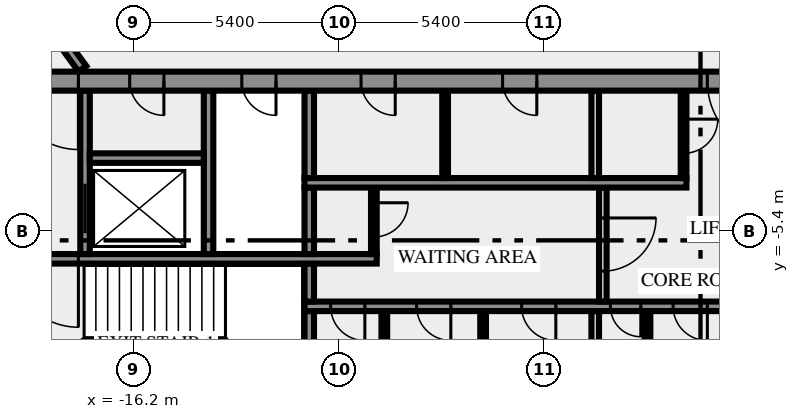
"""IFC4 building model, lengths in metres.
Left out: names, types, materials, properties, quantities, classifications, styles, units other than length and angle.
Written with IfcOpenShell. Run it as: python <this file> out.ifc"""

import sys

from ifc_helpers import new_model, si_unit, direction, frame, frame_2d, origin, place, context, subcontext, project, spatial, rectangle, extrude, element, fill, save


model = new_model("IFC4")
c1 = context("Model", 3, precision=1e-05, world=origin(), true_north=direction((0.0, 1.0)))
c2 = subcontext(c1, "Body", "Model", "MODEL_VIEW")
j1 = project(units=[si_unit("LENGTHUNIT", "METRE"), si_unit("PLANEANGLEUNIT", "RADIAN")], contexts=[c1])
p1 = place(None, origin())
s1 = spatial("IfcSite", under=j1, at=p1, CompositionType="ELEMENT")
p2 = place(p1, origin())
s2 = spatial("IfcBuilding", under=s1, at=p2, CompositionType="ELEMENT")
p3 = place(p2, frame((0.0, 0.0, 144.0)))
s3 = spatial("IfcBuildingStorey", under=s2, at=p3, CompositionType="ELEMENT", Elevation=144.0)
p4 = place(p3, frame((-11.575, -10.5, 0.0), z_axis=(0.0, 0.0, 1.0), x_axis=(0.0, 1.0, 0.0)))
e1 = element("IfcWall", 1, at=p4, inside=s3, PredefinedType="SHEAR", context=c2, shape_type="SweptSolid", body=[
    extrude(rectangle(XDim=3.0, YDim=0.25, at=frame_2d((1.5, 0.0))), origin(), (0.0, 0.0, 1.0), 3.65),
])
for number, where, z_axis, x_axis in (
    (2, (-9.6, -10.5, 0.0), (0.0, 0.0, 1.0), (0.0, 1.0, 0.0)),
    (3, (-7.0, -10.5, 0.0), (0.0, 0.0, 1.0), (0.0, 1.0, 0.0)),
):
    element("IfcWall", number, at=place(p3, frame(where, z_axis=z_axis, x_axis=x_axis)), inside=s3, PredefinedType="PARTITIONING", context=c2, shape_type="SweptSolid", body=[
        extrude(rectangle(XDim=3.0, YDim=0.15, at=frame_2d((1.5, 0.0))), origin(), (0.0, 0.0, 1.0), 3.65),
    ])
p5 = place(p3, frame((-4.05, -10.5, 0.0), z_axis=(0.0, 0.0, 1.0), x_axis=(0.0, 1.0, 0.0)))
e4 = element("IfcWall", 4, at=p5, inside=s3, PredefinedType="SOLIDWALL", context=c2, shape_type="SweptSolid", body=[
    extrude(rectangle(XDim=3.0, YDim=0.2, at=frame_2d((1.5, 0.0))), origin(), (0.0, 0.0, 1.0), 3.65),
])
p6 = place(p3, frame((-2.675, -10.5, 0.0), z_axis=(0.0, 0.0, 1.0), x_axis=(0.0, 1.0, 0.0)))
e5 = element("IfcWall", 5, at=p6, inside=s3, PredefinedType="PARTITIONING", context=c2, shape_type="SweptSolid", body=[
    extrude(rectangle(XDim=3.0, YDim=0.15, at=frame_2d((1.5, 0.0))), origin(), (0.0, 0.0, 1.0), 3.65),
])
p7 = place(p3, frame((11.7, -7.375, 0.0), z_axis=(0.0, 0.0, 1.0), x_axis=(-1.0, 0.0, 0.0)))
e6 = element("IfcWall", 6, at=p7, inside=s3, PredefinedType="SHEAR", context=c2, shape_type="SweptSolid", body=[
    extrude(rectangle(XDim=23.4, YDim=0.25, at=frame_2d((11.7, 0.0))), origin(), (0.0, 0.0, 1.0), 3.65),
])
p8 = place(p7, frame((21.812, 0.0, 0.0)))
e7 = element("IfcOpeningElement", 7, at=p8, cuts=e6, PredefinedType="OPENING", context=c2, shape_type="SweptSolid", body=[
    extrude(rectangle(XDim=0.9, YDim=2.1, at=frame_2d((0.45, 1.05))), frame((0.0, 0.135, 0.0), z_axis=(0.0, -1.0, 0.0), x_axis=(1.0, 0.0, 0.0)), (0.0, 0.0, 1.0), 0.27),
])
p9 = place(p7, frame((19.55, 0.0, 0.0)))
e8 = element("IfcOpeningElement", 8, at=p9, cuts=e6, PredefinedType="OPENING", context=c2, shape_type="SweptSolid", body=[
    extrude(rectangle(XDim=0.9, YDim=2.1, at=frame_2d((0.45, 1.05))), frame((0.0, 0.135, 0.0), z_axis=(0.0, -1.0, 0.0), x_axis=(1.0, 0.0, 0.0)), (0.0, 0.0, 1.0), 0.27),
])
p10 = place(p7, frame((16.787, 0.0, 0.0)))
e9 = element("IfcOpeningElement", 9, at=p10, cuts=e6, PredefinedType="OPENING", context=c2, shape_type="SweptSolid", body=[
    extrude(rectangle(XDim=0.9, YDim=2.1, at=frame_2d((0.45, 1.05))), frame((0.0, 0.135, 0.0), z_axis=(0.0, -1.0, 0.0), x_axis=(1.0, 0.0, 0.0)), (0.0, 0.0, 1.0), 0.27),
])
p11 = place(p7, frame((14.55, 0.0, 0.0)))
e10 = element("IfcOpeningElement", 10, at=p11, cuts=e6, PredefinedType="OPENING", context=c2, shape_type="SweptSolid", body=[
    extrude(rectangle(XDim=0.8, YDim=2.1, at=frame_2d((0.4, 1.05))), frame((0.0, 0.135, 0.0), z_axis=(0.0, -1.0, 0.0), x_axis=(1.0, 0.0, 0.0)), (0.0, 0.0, 1.0), 0.27),
])
p12 = place(p7, frame((12.8, 0.0, 0.0)))
e11 = element("IfcOpeningElement", 11, at=p12, cuts=e6, PredefinedType="OPENING", context=c2, shape_type="SweptSolid", body=[
    extrude(rectangle(XDim=0.9, YDim=2.1, at=frame_2d((0.45, 1.05))), frame((0.0, 0.135, 0.0), z_axis=(0.0, -1.0, 0.0), x_axis=(1.0, 0.0, 0.0)), (0.0, 0.0, 1.0), 0.27),
])
p13 = place(p7, frame((10.7, 0.0, 0.0)))
e12 = element("IfcOpeningElement", 12, at=p13, cuts=e6, PredefinedType="OPENING", context=c2, shape_type="SweptSolid", body=[
    extrude(rectangle(XDim=0.9, YDim=2.1, at=frame_2d((0.45, 1.05))), frame((0.0, 0.135, 0.0), z_axis=(0.0, -1.0, 0.0), x_axis=(1.0, 0.0, 0.0)), (0.0, 0.0, 1.0), 0.27),
])
p14 = place(p7, frame((8.35, 0.0, 0.0)))
e13 = element("IfcOpeningElement", 13, at=p14, cuts=e6, PredefinedType="OPENING", context=c2, shape_type="SweptSolid", body=[
    extrude(rectangle(XDim=1.1, YDim=2.1, at=frame_2d((0.55, 1.05))), frame((0.0, 0.135, 0.0), z_axis=(0.0, -1.0, 0.0), x_axis=(1.0, 0.0, 0.0)), (0.0, 0.0, 1.0), 0.27),
])
p15 = place(p7, frame((5.85, 0.0, 0.0)))
e14 = element("IfcOpeningElement", 14, at=p15, cuts=e6, PredefinedType="OPENING", context=c2, shape_type="SweptSolid", body=[
    extrude(rectangle(XDim=1.1, YDim=2.1, at=frame_2d((0.55, 1.05))), frame((0.0, 0.135, 0.0), z_axis=(0.0, -1.0, 0.0), x_axis=(1.0, 0.0, 0.0)), (0.0, 0.0, 1.0), 0.27),
])
p16 = place(p7, frame((3.35, 0.0, 0.0)))
e15 = element("IfcOpeningElement", 15, at=p16, cuts=e6, PredefinedType="OPENING", context=c2, shape_type="SweptSolid", body=[
    extrude(rectangle(XDim=1.1, YDim=2.1, at=frame_2d((0.55, 1.05))), frame((0.0, 0.135, 0.0), z_axis=(0.0, -1.0, 0.0), x_axis=(1.0, 0.0, 0.0)), (0.0, 0.0, 1.0), 0.27),
])
p17 = place(p7, frame((0.85, 0.0, 0.0)))
e16 = element("IfcOpeningElement", 16, at=p17, cuts=e6, PredefinedType="OPENING", context=c2, shape_type="SweptSolid", body=[
    extrude(rectangle(XDim=1.1, YDim=2.1, at=frame_2d((0.55, 1.05))), frame((0.0, 0.135, 0.0), z_axis=(0.0, -1.0, 0.0), x_axis=(1.0, 0.0, 0.0)), (0.0, 0.0, 1.0), 0.27),
])
p18 = place(p3, frame((-11.575, -7.25, 0.0), z_axis=(0.0, 0.0, 1.0), x_axis=(0.0, 1.0, 0.0)))
e17 = element("IfcWall", 17, at=p18, inside=s3, PredefinedType="SHEAR", context=c2, shape_type="SweptSolid", body=[
    extrude(rectangle(XDim=1.0, YDim=0.25, at=frame_2d((0.5, 0.0))), origin(), (0.0, 0.0, 1.0), 3.65),
])
p19 = place(p3, frame((-3.85, -4.25, 0.0), z_axis=(0.0, 0.0, 1.0), x_axis=(0.0, -1.0, 0.0)))
e18 = element("IfcWall", 18, at=p19, inside=s3, PredefinedType="SOLIDWALL", context=c2, shape_type="SweptSolid", body=[
    extrude(rectangle(XDim=3.0, YDim=0.2, at=frame_2d((1.5, 0.0))), origin(), (0.0, 0.0, 1.0), 3.65),
])
p20 = place(p19, frame((0.8, 0.0, 0.0)))
e19 = element("IfcOpeningElement", 19, at=p20, cuts=e18, PredefinedType="OPENING", context=c2, shape_type="SweptSolid", body=[
    extrude(rectangle(XDim=1.4, YDim=2.1, at=frame_2d((0.7, 1.05))), frame((0.0, 0.11, 0.0), z_axis=(0.0, -1.0, 0.0), x_axis=(1.0, 0.0, 0.0)), (0.0, 0.0, 1.0), 0.22),
])
p21 = place(p3, frame((-9.8, -6.125, 0.0), z_axis=(0.0, 0.0, 1.0), x_axis=(-1.0, 0.0, 0.0)))
e20 = element("IfcWall", 20, at=p21, inside=s3, PredefinedType="SHEAR", context=c2, shape_type="SweptSolid", body=[
    extrude(rectangle(XDim=10.2, YDim=0.25, at=frame_2d((5.1, 0.0))), origin(), (0.0, 0.0, 1.0), 3.65),
])
p22 = place(p21, frame((7.85, 0.0, 0.0)))
e21 = element("IfcOpeningElement", 21, at=p22, cuts=e20, PredefinedType="OPENING", context=c2, shape_type="SweptSolid", body=[
    extrude(rectangle(XDim=1.8, YDim=2.1, at=frame_2d((0.9, 1.05))), frame((0.0, 0.135, 0.0), z_axis=(0.0, -1.0, 0.0), x_axis=(1.0, 0.0, 0.0)), (0.0, 0.0, 1.0), 0.27),
])
p23 = place(p3, frame((-17.475, -6.0, 0.0), z_axis=(0.0, 0.0, 1.0), x_axis=(0.0, 1.0, 0.0)))
e22 = element("IfcWall", 22, at=p23, inside=s3, PredefinedType="SHEAR", context=c2, shape_type="SweptSolid", body=[
    extrude(rectangle(XDim=4.3, YDim=0.25, at=frame_2d((2.15, 0.0))), origin(), (0.0, 0.0, 1.0), 3.65),
])
p24 = place(p23, frame((0.55, 0.0, 0.0)))
e23 = element("IfcOpeningElement", 23, at=p24, cuts=e22, PredefinedType="OPENING", context=c2, shape_type="SweptSolid", body=[
    extrude(rectangle(XDim=1.3, YDim=2.1, at=frame_2d((0.65, 1.05))), frame((0.0, 0.135, 0.0), z_axis=(0.0, -1.0, 0.0), x_axis=(1.0, 0.0, 0.0)), (0.0, 0.0, 1.0), 0.27),
])
p25 = place(p3, frame((-14.225, -6.0, 0.0), z_axis=(0.0, 0.0, 1.0), x_axis=(0.0, 1.0, 0.0)))
e24 = element("IfcWall", 24, at=p25, inside=s3, PredefinedType="SHEAR", context=c2, shape_type="SweptSolid", body=[
    extrude(rectangle(XDim=4.3, YDim=0.25, at=frame_2d((2.15, 0.0))), origin(), (0.0, 0.0, 1.0), 3.65),
])
p26 = place(p3, frame((-11.575, -6.0, 0.0), z_axis=(0.0, 0.0, 1.0), x_axis=(0.0, 1.0, 0.0)))
e25 = element("IfcWall", 25, at=p26, inside=s3, PredefinedType="SHEAR", context=c2, shape_type="SweptSolid", body=[
    extrude(rectangle(XDim=1.75, YDim=0.25, at=frame_2d((0.875, 0.0))), origin(), (0.0, 0.0, 1.0), 3.65),
])
p27 = place(p3, frame((-9.875, -4.25, 0.0), z_axis=(0.0, 0.0, 1.0), x_axis=(0.0, -1.0, 0.0)))
e26 = element("IfcWall", 26, at=p27, inside=s3, PredefinedType="PARTITIONING", context=c2, shape_type="SweptSolid", body=[
    extrude(rectangle(XDim=1.75, YDim=0.15, at=frame_2d((0.875, 0.0))), origin(), (0.0, 0.0, 1.0), 3.65),
])
p28 = place(p27, frame((0.4, 0.0, 0.0)))
e27 = element("IfcOpeningElement", 27, at=p28, cuts=e26, PredefinedType="OPENING", context=c2, shape_type="SweptSolid", body=[
    extrude(rectangle(XDim=0.9, YDim=2.1, at=frame_2d((0.45, 1.05))), frame((0.0, 0.085, 0.0), z_axis=(0.0, -1.0, 0.0), x_axis=(1.0, 0.0, 0.0)), (0.0, 0.0, 1.0), 0.17),
])
p29 = place(p3, frame((-11.7, -4.125, 0.0), z_axis=(0.0, 0.0, 1.0), x_axis=(1.0, 0.0, 0.0)))
e28 = element("IfcWall", 28, at=p29, inside=s3, PredefinedType="SHEAR", context=c2, shape_type="SweptSolid", body=[
    extrude(rectangle(XDim=10.05, YDim=0.25, at=frame_2d((5.025, 0.0))), origin(), (0.0, 0.0, 1.0), 3.65),
])
p30 = place(p3, frame((-11.575, -4.0, 0.0), z_axis=(0.0, 0.0, 1.0), x_axis=(0.0, 1.0, 0.0)))
e29 = element("IfcWall", 29, at=p30, inside=s3, PredefinedType="SHEAR", context=c2, shape_type="SweptSolid", body=[
    extrude(rectangle(XDim=2.3, YDim=0.25, at=frame_2d((1.15, 0.0))), origin(), (0.0, 0.0, 1.0), 3.65),
])
p31 = place(p3, frame((-8.0, -4.0, 0.0), z_axis=(0.0, 0.0, 1.0), x_axis=(0.0, 1.0, 0.0)))
e30 = element("IfcWall", 30, at=p31, inside=s3, PredefinedType="PARTITIONING", context=c2, shape_type="SweptSolid", body=[
    extrude(rectangle(XDim=2.3, YDim=0.15, at=frame_2d((1.15, 0.0))), origin(), (0.0, 0.0, 1.0), 3.65),
])
p32 = place(p3, frame((-4.05, -4.0, 0.0), z_axis=(0.0, 0.0, 1.0), x_axis=(0.0, 1.0, 0.0)))
e31 = element("IfcWall", 31, at=p32, inside=s3, PredefinedType="SOLIDWALL", context=c2, shape_type="SweptSolid", body=[
    extrude(rectangle(XDim=2.3, YDim=0.2, at=frame_2d((1.15, 0.0))), origin(), (0.0, 0.0, 1.0), 3.65),
])
p33 = place(p3, frame((-1.725, -1.7, 0.0), z_axis=(0.0, 0.0, 1.0), x_axis=(0.0, -1.0, 0.0)))
e32 = element("IfcWall", 32, at=p33, inside=s3, PredefinedType="PARTITIONING", context=c2, shape_type="SweptSolid", body=[
    extrude(rectangle(XDim=2.3, YDim=0.15, at=frame_2d((1.15, 0.0))), origin(), (0.0, 0.0, 1.0), 3.65),
])
p34 = place(p33, frame((0.75, 0.0, 0.0)))
e33 = element("IfcOpeningElement", 33, at=p34, cuts=e32, PredefinedType="OPENING", context=c2, shape_type="SweptSolid", body=[
    extrude(rectangle(XDim=0.9, YDim=2.1, at=frame_2d((0.45, 1.05))), frame((0.0, 0.085, 0.0), z_axis=(0.0, -1.0, 0.0), x_axis=(1.0, 0.0, 0.0)), (0.0, 0.0, 1.0), 0.17),
])
p35 = place(p3, frame((-17.35, -3.475, 0.0), z_axis=(0.0, 0.0, 1.0), x_axis=(1.0, 0.0, 0.0)))
e34 = element("IfcWall", 34, at=p35, inside=s3, PredefinedType="SHEAR", context=c2, shape_type="SweptSolid", body=[
    extrude(rectangle(XDim=3.0, YDim=0.25, at=frame_2d((1.5, 0.0))), origin(), (0.0, 0.0, 1.0), 3.65),
])
p36 = place(p3, frame((20.49, -1.45, 0.0), z_axis=(0.0, 0.0, 1.0), x_axis=(-1.0, 0.0, 0.0)))
e35 = element("IfcWall", 35, at=p36, inside=s3, PredefinedType="SHEAR", context=c2, shape_type="SweptSolid", body=[
    extrude(rectangle(XDim=40.98, YDim=0.5, at=frame_2d((20.49, 0.0))), origin(), (0.0, 0.0, 1.0), 3.65),
])
p37 = place(p36, frame((38.14, 0.0, 0.0)))
e36 = element("IfcOpeningElement", 36, at=p37, cuts=e35, PredefinedType="OPENING", context=c2, shape_type="SweptSolid", body=[
    extrude(rectangle(XDim=1.8, YDim=2.1, at=frame_2d((0.9, 1.05))), frame((0.0, 0.26, 0.0), z_axis=(0.0, -1.0, 0.0), x_axis=(1.0, 0.0, 0.0)), (0.0, 0.0, 1.0), 0.52),
])
p38 = place(p36, frame((35.89, 0.0, 0.0)))
e37 = element("IfcOpeningElement", 37, at=p38, cuts=e35, PredefinedType="OPENING", context=c2, shape_type="SweptSolid", body=[
    extrude(rectangle(XDim=0.9, YDim=2.1, at=frame_2d((0.45, 1.05))), frame((0.0, 0.26, 0.0), z_axis=(0.0, -1.0, 0.0), x_axis=(1.0, 0.0, 0.0)), (0.0, 0.0, 1.0), 0.52),
])
p39 = place(p36, frame((32.94, 0.0, 0.0)))
e38 = element("IfcOpeningElement", 38, at=p39, cuts=e35, PredefinedType="OPENING", context=c2, shape_type="SweptSolid", body=[
    extrude(rectangle(XDim=0.9, YDim=2.1, at=frame_2d((0.45, 1.05))), frame((0.0, 0.26, 0.0), z_axis=(0.0, -1.0, 0.0), x_axis=(1.0, 0.0, 0.0)), (0.0, 0.0, 1.0), 0.52),
])
p40 = place(p36, frame((29.802, 0.0, 0.0)))
e39 = element("IfcOpeningElement", 39, at=p40, cuts=e35, PredefinedType="OPENING", context=c2, shape_type="SweptSolid", body=[
    extrude(rectangle(XDim=0.9, YDim=2.1, at=frame_2d((0.45, 1.05))), frame((0.0, 0.26, 0.0), z_axis=(0.0, -1.0, 0.0), x_axis=(1.0, 0.0, 0.0)), (0.0, 0.0, 1.0), 0.52),
])
p41 = place(p36, frame((26.077, 0.0, 0.0)))
e40 = element("IfcOpeningElement", 40, at=p41, cuts=e35, PredefinedType="OPENING", context=c2, shape_type="SweptSolid", body=[
    extrude(rectangle(XDim=0.9, YDim=2.1, at=frame_2d((0.45, 1.05))), frame((0.0, 0.26, 0.0), z_axis=(0.0, -1.0, 0.0), x_axis=(1.0, 0.0, 0.0)), (0.0, 0.0, 1.0), 0.52),
])
p42 = place(p36, frame((19.59, 0.0, 0.0)))
e41 = element("IfcOpeningElement", 41, at=p42, cuts=e35, PredefinedType="OPENING", context=c2, shape_type="SweptSolid", body=[
    extrude(rectangle(XDim=2.0, YDim=2.1, at=frame_2d((1.0, 1.05))), frame((0.0, 0.26, 0.0), z_axis=(0.0, -1.0, 0.0), x_axis=(1.0, 0.0, 0.0)), (0.0, 0.0, 1.0), 0.52),
])
p43 = place(p36, frame((7.14, 0.0, 0.0)))
e42 = element("IfcOpeningElement", 42, at=p43, cuts=e35, PredefinedType="OPENING", context=c2, shape_type="SweptSolid", body=[
    extrude(rectangle(XDim=0.9, YDim=2.1, at=frame_2d((0.45, 1.05))), frame((0.0, 0.26, 0.0), z_axis=(0.0, -1.0, 0.0), x_axis=(1.0, 0.0, 0.0)), (0.0, 0.0, 1.0), 0.52),
])
p44 = place(p36, frame((5.028, 0.0, 0.0)))
e43 = element("IfcOpeningElement", 43, at=p44, cuts=e35, PredefinedType="OPENING", context=c2, shape_type="SweptSolid", body=[
    extrude(rectangle(XDim=0.8, YDim=2.1, at=frame_2d((0.4, 1.05))), frame((0.0, 0.26, 0.0), z_axis=(0.0, -1.0, 0.0), x_axis=(1.0, 0.0, 0.0)), (0.0, 0.0, 1.0), 0.52),
])
p45 = place(p36, frame((3.452, 0.0, 0.0)))
e44 = element("IfcOpeningElement", 44, at=p45, cuts=e35, PredefinedType="OPENING", context=c2, shape_type="SweptSolid", body=[
    extrude(rectangle(XDim=0.8, YDim=2.1, at=frame_2d((0.4, 1.05))), frame((0.0, 0.26, 0.0), z_axis=(0.0, -1.0, 0.0), x_axis=(1.0, 0.0, 0.0)), (0.0, 0.0, 1.0), 0.52),
])
p46 = place(p36, frame((1.04, 0.0, 0.0)))
e45 = element("IfcOpeningElement", 45, at=p46, cuts=e35, PredefinedType="OPENING", context=c2, shape_type="SweptSolid", body=[
    extrude(rectangle(XDim=1.8, YDim=2.1, at=frame_2d((0.9, 1.05))), frame((0.0, 0.26, 0.0), z_axis=(0.0, -1.0, 0.0), x_axis=(1.0, 0.0, 0.0)), (0.0, 0.0, 1.0), 0.52),
])
p47 = place(p3, frame((-35.092, 23.027, 0.0), z_axis=(0.0, 0.0, 1.0), x_axis=(0.587784076945, -0.809017848313, 0.0)))
e46 = element("IfcWall", 46, at=p47, inside=s3, PredefinedType="SOLIDWALL", context=c2, shape_type="SweptSolid", body=[
    extrude(rectangle(XDim=29.853, YDim=0.25, at=frame_2d((14.927, 0.0))), origin(), (0.0, 0.0, 1.0), 3.65),
])
p48 = place(p47, frame((0.224, 0.0, 0.0)))
e47 = element("IfcOpeningElement", 47, at=p48, cuts=e46, PredefinedType="OPENING", context=c2, shape_type="SweptSolid", body=[
    extrude(rectangle(XDim=0.9, YDim=2.1, at=frame_2d((0.45, 1.05))), frame((0.0, 0.135, 0.0), z_axis=(0.0, -1.0, 0.0), x_axis=(1.0, 0.0, 0.0)), (0.0, 0.0, 1.0), 0.27),
])
p49 = place(p47, frame((25.512, 0.0, 0.0)))
e48 = element("IfcOpeningElement", 48, at=p49, cuts=e46, PredefinedType="OPENING", context=c2, shape_type="SweptSolid", body=[
    extrude(rectangle(XDim=0.9, YDim=2.1, at=frame_2d((0.45, 1.05))), frame((0.0, 0.135, 0.0), z_axis=(0.0, -1.0, 0.0), x_axis=(1.0, 0.0, 0.0)), (0.0, 0.0, 1.0), 0.27),
])
p50 = place(p8, origin())
e49 = element("IfcDoor", 49, at=p50, inside=s3, OperationType="SINGLE_SWING_RIGHT", PredefinedType="DOOR", context=c2, shape_type="SweptSolid", body=[
    extrude(rectangle(XDim=0.9, YDim=2.1, at=frame_2d((0.45, 1.05))), frame((0.0, 0.025, 0.0), z_axis=(0.0, -1.0, 0.0), x_axis=(1.0, 0.0, 0.0)), (0.0, 0.0, 1.0), 0.05),
])
fill(e7, e49)
p51 = place(p9, origin())
e50 = element("IfcDoor", 50, at=p51, inside=s3, OperationType="SINGLE_SWING_RIGHT", PredefinedType="DOOR", context=c2, shape_type="SweptSolid", body=[
    extrude(rectangle(XDim=0.9, YDim=2.1, at=frame_2d((0.45, 1.05))), frame((0.0, 0.025, 0.0), z_axis=(0.0, -1.0, 0.0), x_axis=(1.0, 0.0, 0.0)), (0.0, 0.0, 1.0), 0.05),
])
fill(e8, e50)
p52 = place(p10, origin())
e51 = element("IfcDoor", 51, at=p52, inside=s3, OperationType="SINGLE_SWING_RIGHT", PredefinedType="DOOR", context=c2, shape_type="SweptSolid", body=[
    extrude(rectangle(XDim=0.9, YDim=2.1, at=frame_2d((0.45, 1.05))), frame((0.0, 0.025, 0.0), z_axis=(0.0, -1.0, 0.0), x_axis=(1.0, 0.0, 0.0)), (0.0, 0.0, 1.0), 0.05),
])
fill(e9, e51)
p53 = place(p11, origin())
e52 = element("IfcDoor", 52, at=p53, inside=s3, OperationType="SINGLE_SWING_RIGHT", PredefinedType="DOOR", context=c2, shape_type="SweptSolid", body=[
    extrude(rectangle(XDim=0.8, YDim=2.1, at=frame_2d((0.4, 1.05))), frame((0.0, 0.025, 0.0), z_axis=(0.0, -1.0, 0.0), x_axis=(1.0, 0.0, 0.0)), (0.0, 0.0, 1.0), 0.05),
])
fill(e10, e52)
p54 = place(p12, origin())
e53 = element("IfcDoor", 53, at=p54, inside=s3, OperationType="SINGLE_SWING_RIGHT", PredefinedType="DOOR", context=c2, shape_type="SweptSolid", body=[
    extrude(rectangle(XDim=0.9, YDim=2.1, at=frame_2d((0.45, 1.05))), frame((0.0, 0.025, 0.0), z_axis=(0.0, -1.0, 0.0), x_axis=(1.0, 0.0, 0.0)), (0.0, 0.0, 1.0), 0.05),
])
fill(e11, e53)
p55 = place(p20, origin())
e54 = element("IfcDoor", 54, at=p55, inside=s3, OperationType="DOUBLE_DOOR_SINGLE_SWING", PredefinedType="DOOR", context=c2, shape_type="SweptSolid", body=[
    extrude(rectangle(XDim=1.4, YDim=2.1, at=frame_2d((0.7, 1.05))), frame((0.0, 0.025, 0.0), z_axis=(0.0, -1.0, 0.0), x_axis=(1.0, 0.0, 0.0)), (0.0, 0.0, 1.0), 0.05),
])
fill(e19, e54)
p56 = place(p22, origin())
e55 = element("IfcDoor", 55, at=p56, inside=s3, OperationType="DOUBLE_DOOR_SINGLE_SWING", PredefinedType="DOOR", context=c2, shape_type="SweptSolid", body=[
    extrude(rectangle(XDim=1.8, YDim=2.1, at=frame_2d((0.9, 1.05))), frame((0.0, 0.025, 0.0), z_axis=(0.0, -1.0, 0.0), x_axis=(1.0, 0.0, 0.0)), (0.0, 0.0, 1.0), 0.05),
])
fill(e21, e55)
p57 = place(p24, origin())
e56 = element("IfcDoor", 56, at=p57, inside=s3, OperationType="DOUBLE_DOOR_SLIDING", PredefinedType="DOOR", context=c2, shape_type="SweptSolid", body=[
    extrude(rectangle(XDim=1.3, YDim=2.1, at=frame_2d((0.65, 1.05))), frame((0.0, 0.025, 0.0), z_axis=(0.0, -1.0, 0.0), x_axis=(1.0, 0.0, 0.0)), (0.0, 0.0, 1.0), 0.05),
])
fill(e23, e56)
p58 = place(p28, origin())
e57 = element("IfcDoor", 57, at=p58, inside=s3, OperationType="SINGLE_SWING_LEFT", PredefinedType="DOOR", context=c2, shape_type="SweptSolid", body=[
    extrude(rectangle(XDim=0.9, YDim=2.1, at=frame_2d((0.45, 1.05))), frame((0.0, 0.025, 0.0), z_axis=(0.0, -1.0, 0.0), x_axis=(1.0, 0.0, 0.0)), (0.0, 0.0, 1.0), 0.05),
])
fill(e27, e57)
p59 = place(p34, origin())
e58 = element("IfcDoor", 58, at=p59, inside=s3, OperationType="SINGLE_SWING_RIGHT", PredefinedType="DOOR", context=c2, shape_type="SweptSolid", body=[
    extrude(rectangle(XDim=0.9, YDim=2.1, at=frame_2d((0.45, 1.05))), frame((0.0, 0.025, 0.0), z_axis=(0.0, -1.0, 0.0), x_axis=(1.0, 0.0, 0.0)), (0.0, 0.0, 1.0), 0.05),
])
fill(e33, e58)
p60 = place(p37, origin())
e59 = element("IfcDoor", 59, at=p60, inside=s3, OperationType="DOUBLE_DOOR_SINGLE_SWING", PredefinedType="DOOR", context=c2, shape_type="SweptSolid", body=[
    extrude(rectangle(XDim=1.8, YDim=2.1, at=frame_2d((0.9, 1.05))), frame((0.0, 0.025, 0.0), z_axis=(0.0, -1.0, 0.0), x_axis=(1.0, 0.0, 0.0)), (0.0, 0.0, 1.0), 0.05),
])
fill(e36, e59)
p61 = place(p38, origin())
e60 = element("IfcDoor", 60, at=p61, inside=s3, OperationType="SINGLE_SWING_RIGHT", PredefinedType="DOOR", context=c2, shape_type="SweptSolid", body=[
    extrude(rectangle(XDim=0.9, YDim=2.1, at=frame_2d((0.45, 1.05))), frame((0.0, 0.025, 0.0), z_axis=(0.0, -1.0, 0.0), x_axis=(1.0, 0.0, 0.0)), (0.0, 0.0, 1.0), 0.05),
])
fill(e37, e60)
p62 = place(p39, origin())
e61 = element("IfcDoor", 61, at=p62, inside=s3, OperationType="SINGLE_SWING_RIGHT", PredefinedType="DOOR", context=c2, shape_type="SweptSolid", body=[
    extrude(rectangle(XDim=0.9, YDim=2.1, at=frame_2d((0.45, 1.05))), frame((0.0, 0.025, 0.0), z_axis=(0.0, -1.0, 0.0), x_axis=(1.0, 0.0, 0.0)), (0.0, 0.0, 1.0), 0.05),
])
fill(e38, e61)
p63 = place(p40, origin())
e62 = element("IfcDoor", 62, at=p63, inside=s3, OperationType="SINGLE_SWING_RIGHT", PredefinedType="DOOR", context=c2, shape_type="SweptSolid", body=[
    extrude(rectangle(XDim=0.9, YDim=2.1, at=frame_2d((0.45, 1.05))), frame((0.0, 0.025, 0.0), z_axis=(0.0, -1.0, 0.0), x_axis=(1.0, 0.0, 0.0)), (0.0, 0.0, 1.0), 0.05),
])
fill(e39, e62)
p64 = place(p41, origin())
e63 = element("IfcDoor", 63, at=p64, inside=s3, OperationType="SINGLE_SWING_RIGHT", PredefinedType="DOOR", context=c2, shape_type="SweptSolid", body=[
    extrude(rectangle(XDim=0.9, YDim=2.1, at=frame_2d((0.45, 1.05))), frame((0.0, 0.025, 0.0), z_axis=(0.0, -1.0, 0.0), x_axis=(1.0, 0.0, 0.0)), (0.0, 0.0, 1.0), 0.05),
])
fill(e40, e63)
p65 = place(p42, origin())
e64 = element("IfcDoor", 64, at=p65, inside=s3, OperationType="DOUBLE_DOOR_SINGLE_SWING", PredefinedType="DOOR", context=c2, shape_type="SweptSolid", body=[
    extrude(rectangle(XDim=2.0, YDim=2.1, at=frame_2d((1.0, 1.05))), frame((0.0, 0.025, 0.0), z_axis=(0.0, -1.0, 0.0), x_axis=(1.0, 0.0, 0.0)), (0.0, 0.0, 1.0), 0.05),
])
fill(e41, e64)
save(model, sys.argv[1])
